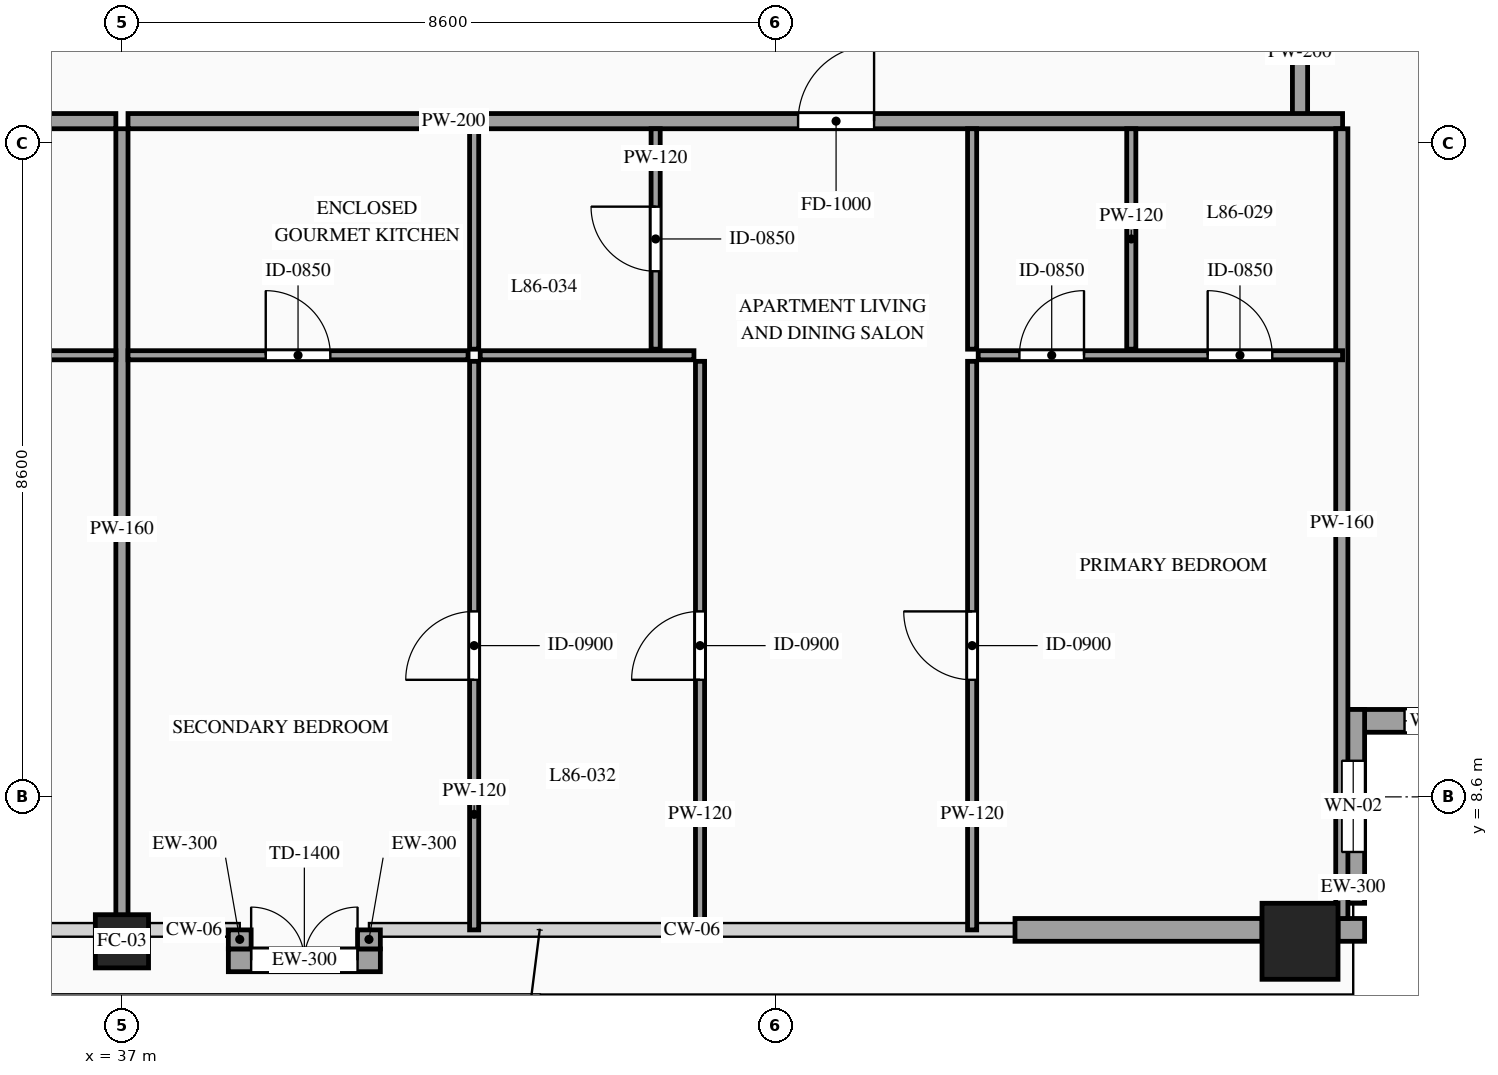
"""IFC4 building model, lengths in metres.
Left out: names, types, materials, properties, quantities, classifications, styles, units other than length and angle.
Written with IfcOpenShell. Run it as: python <this file> out.ifc"""

import sys

from ifc_helpers import new_model, si_unit, direction, frame, frame_2d, origin, origin_2d, place, context, subcontext, project, spatial, rectangle, hollow_rectangle, extrude, source, transform, mapped, element, fill, save


model = new_model("IFC4")
c1 = context("Model", 3, precision=1e-05, world=origin(), true_north=direction((0.0, 1.0)))
c2 = subcontext(c1, "Body", "Model", "MODEL_VIEW")
j1 = project(units=[si_unit("LENGTHUNIT", "METRE"), si_unit("PLANEANGLEUNIT", "RADIAN")], contexts=[c1])
p1 = place(None, origin())
s1 = spatial("IfcSite", under=j1, at=p1, CompositionType="ELEMENT")
p2 = place(p1, origin())
s2 = spatial("IfcBuilding", under=s1, at=p2, CompositionType="ELEMENT")
p3 = place(p2, frame((0.0, 0.0, 321.7)))
s3 = spatial("IfcBuildingStorey", under=s2, at=p3, CompositionType="ELEMENT", Elevation=321.7)
m1 = source(origin(), c2, "Body", "SweptSolid", [
    extrude(hollow_rectangle(XDim=0.7, YDim=0.7, WallThickness=0.032, at=origin_2d()), origin(), (0.0, 0.0, 1.0), 3.5),
])
p4 = place(p3, frame((37.0, 6.7, 0.0), z_axis=(0.0, 0.0, 1.0), x_axis=(1.0, 0.0, 0.0)))
e1 = element("IfcColumn", 1, at=p4, inside=s3, PredefinedType="COLUMN", context=c2, shape_type="MappedRepresentation", body=[
    mapped(m1, transform((0.0, 0.0, 0.0), scale=1.0)),
])
m2 = source(origin(), c2, "Body", "SweptSolid", [
    extrude(hollow_rectangle(XDim=1.0, YDim=1.0, WallThickness=0.048, at=origin_2d()), origin(), (0.0, 0.0, 1.0), 3.5),
])
p5 = place(p3, frame((52.5, 6.7, 0.0), z_axis=(0.0, 0.0, 1.0), x_axis=(1.0, 0.0, 0.0)))
e2 = element("IfcColumn", 2, at=p5, inside=s3, PredefinedType="COLUMN", context=c2, shape_type="MappedRepresentation", body=[
    mapped(m2, transform((0.0, 0.0, 0.0), scale=1.0)),
])
p6 = place(p3, frame((53.05, 9.6, 0.0), z_axis=(0.0, 0.0, 1.0), x_axis=(1.0, 0.0, 0.0)))
e3 = element("IfcWall", 3, at=p6, inside=s3, PredefinedType="SOLIDWALL", context=c2, shape_type="SweptSolid", body=[
    extrude(rectangle(XDim=2.55, YDim=0.3, at=frame_2d((1.275, 0.0))), origin(), (0.0, 0.0, 1.0), 3.28),
])
p7 = place(p6, frame((0.825, 0.0, 0.85)))
e4 = element("IfcOpeningElement", 4, at=p7, cuts=e3, PredefinedType="OPENING", context=c2, shape_type="SweptSolid", body=[
    extrude(rectangle(XDim=0.9, YDim=1.5, at=frame_2d((0.45, 0.75))), frame((0.0, 0.165, 0.0), z_axis=(0.0, -1.0, 0.0), x_axis=(1.0, 0.0, 0.0)), (0.0, 0.0, 1.0), 0.33),
])
p8 = place(p3, frame((53.2, 7.2, 0.0), z_axis=(0.0, 0.0, 1.0), x_axis=(0.0, 1.0, 0.0)))
e5 = element("IfcWall", 5, at=p8, inside=s3, PredefinedType="SOLIDWALL", context=c2, shape_type="SweptSolid", body=[
    extrude(rectangle(XDim=2.55, YDim=0.3, at=frame_2d((1.275, 0.0))), origin(), (0.0, 0.0, 1.0), 3.28),
])
p9 = place(p8, frame((0.675, 0.0, 0.85)))
e6 = element("IfcOpeningElement", 6, at=p9, cuts=e5, PredefinedType="OPENING", context=c2, shape_type="SweptSolid", body=[
    extrude(rectangle(XDim=1.2, YDim=2.1, at=frame_2d((0.6, 1.05))), frame((0.0, 0.165, 0.0), z_axis=(0.0, -1.0, 0.0), x_axis=(1.0, 0.0, 0.0)), (0.0, 0.0, 1.0), 0.33),
])
m3 = source(origin(), c2, "Body", "SweptSolid", [
    extrude(rectangle(XDim=0.35, YDim=0.3, at=frame_2d((0.175, 0.0))), origin(), (0.0, 0.0, 1.0), 3.28),
])
p10 = place(p3, frame((53.0, 6.85, 0.0), z_axis=(0.0, 0.0, 1.0), x_axis=(1.0, 0.0, 0.0)))
e7 = element("IfcWall", 7, at=p10, inside=s3, PredefinedType="SOLIDWALL", context=c2, shape_type="MappedRepresentation", body=[
    mapped(m3, transform((0.0, 0.0, 0.0), scale=1.0)),
])
m4 = source(origin(), c2, "Body", "SweptSolid", [
    extrude(rectangle(XDim=3.25, YDim=0.3, at=frame_2d((1.625, 0.0))), origin(), (0.0, 0.0, 1.0), 2.885),
])
p11 = place(p3, frame((48.75, 6.85, 0.0), z_axis=(0.0, 0.0, 1.0), x_axis=(1.0, 0.0, 0.0)))
e8 = element("IfcWall", 8, at=p11, inside=s3, PredefinedType="SOLIDWALL", context=c2, shape_type="MappedRepresentation", body=[
    mapped(m4, transform((0.0, 0.0, 0.0), scale=1.0)),
])
p12 = place(p3, frame((38.4, 6.45, 0.0), z_axis=(0.0, 0.0, 1.0), x_axis=(1.0, 0.0, 0.0)))
e9 = element("IfcWall", 9, at=p12, inside=s3, PredefinedType="SOLIDWALL", context=c2, shape_type="SweptSolid", body=[
    extrude(rectangle(XDim=2.0, YDim=0.3, at=frame_2d((1.0, 0.0))), origin(), (0.0, 0.0, 1.0), 2.885),
])
p13 = place(p12, frame((0.3, 0.0, 0.0)))
e10 = element("IfcOpeningElement", 10, at=p13, cuts=e9, PredefinedType="OPENING", context=c2, shape_type="SweptSolid", body=[
    extrude(rectangle(XDim=1.4, YDim=2.3, at=frame_2d((0.7, 1.15))), frame((0.0, 0.165, 0.0), z_axis=(0.0, -1.0, 0.0), x_axis=(1.0, 0.0, 0.0)), (0.0, 0.0, 1.0), 0.33),
])
m5 = source(origin(), c2, "Body", "SweptSolid", [
    extrude(rectangle(XDim=0.25, YDim=0.3, at=frame_2d((0.125, 0.0))), origin(), (0.0, 0.0, 1.0), 3.28),
])
for number, where, z_axis, x_axis in (
    (11, (38.55, 6.85, 0.0), (0.0, 0.0, 1.0), (0.0, -1.0, 0.0)),
    (12, (40.25, 6.6, 0.0), (0.0, 0.0, 1.0), (0.0, 1.0, 0.0)),
):
    element("IfcWall", number, at=place(p3, frame(where, z_axis=z_axis, x_axis=x_axis)), inside=s3, PredefinedType="SOLIDWALL", context=c2, shape_type="MappedRepresentation", body=[
        mapped(m5, transform((0.0, 0.0, 0.0), scale=1.0)),
    ])
m6 = source(origin(), c2, "Body", "SweptSolid", [
    extrude(rectangle(XDim=1.7, YDim=0.2, at=frame_2d((0.85, 0.0))), origin(), (0.0, 0.0, 1.0), 3.28),
])
p14 = place(p3, frame((52.5, 17.55, 0.0), z_axis=(0.0, 0.0, 1.0), x_axis=(0.0, 1.0, 0.0)))
e13 = element("IfcWall", 13, at=p14, inside=s3, PredefinedType="PARTITIONING", context=c2, shape_type="MappedRepresentation", body=[
    mapped(m6, transform((0.0, 0.0, 0.0), scale=1.0)),
])
p15 = place(p3, frame((20.94, 17.49, 0.0), z_axis=(0.0, 0.0, 1.0), x_axis=(1.0, 0.0, 0.0)))
e14 = element("IfcWall", 14, at=p15, inside=s3, PredefinedType="PARTITIONING", context=c2, shape_type="SweptSolid", body=[
    extrude(rectangle(XDim=15.98, YDim=0.2, at=frame_2d((7.99, 0.0))), origin(), (0.0, 0.0, 1.0), 3.28),
])
p16 = place(p15, frame((8.816, 0.0, 0.0)))
e15 = element("IfcOpeningElement", 15, at=p16, cuts=e14, PredefinedType="OPENING", context=c2, shape_type="SweptSolid", body=[
    extrude(rectangle(XDim=1.0, YDim=2.2, at=frame_2d((0.5, 1.1))), frame((0.0, 0.115, 0.0), z_axis=(0.0, -1.0, 0.0), x_axis=(1.0, 0.0, 0.0)), (0.0, 0.0, 1.0), 0.23),
])
m7 = source(origin(), c2, "Body", "SweptSolid", [
    extrude(rectangle(XDim=10.54, YDim=0.16, at=frame_2d((5.27, 0.0))), origin(), (0.0, 0.0, 1.0), 2.787),
])
p17 = place(p3, frame((37.0, 6.85, 0.0), z_axis=(0.0, 0.0, 1.0), x_axis=(0.0, 1.0, 0.0)))
e16 = element("IfcWall", 16, at=p17, inside=s3, PredefinedType="PARTITIONING", context=c2, shape_type="MappedRepresentation", body=[
    mapped(m7, transform((0.0, 0.0, 0.0), scale=1.0)),
])
p18 = place(p3, frame((32.126, 14.41, 0.0), z_axis=(0.0, 0.0, 1.0), x_axis=(1.0, 0.0, 0.0)))
e17 = element("IfcWall", 17, at=p18, inside=s3, PredefinedType="PARTITIONING", context=c2, shape_type="SweptSolid", body=[
    extrude(rectangle(XDim=4.794, YDim=0.12, at=frame_2d((2.397, 0.0))), origin(), (0.0, 0.0, 1.0), 3.28),
])
p19 = place(p18, frame((3.019, 0.0, 0.0)))
e18 = element("IfcOpeningElement", 18, at=p19, cuts=e17, PredefinedType="OPENING", context=c2, shape_type="SweptSolid", body=[
    extrude(rectangle(XDim=0.85, YDim=2.1, at=frame_2d((0.425, 1.05))), frame((0.0, 0.075, 0.0), z_axis=(0.0, -1.0, 0.0), x_axis=(1.0, 0.0, 0.0)), (0.0, 0.0, 1.0), 0.15),
])
p20 = place(p18, frame((0.542, 0.0, 0.0)))
e19 = element("IfcOpeningElement", 19, at=p20, cuts=e17, PredefinedType="OPENING", context=c2, shape_type="SweptSolid", body=[
    extrude(rectangle(XDim=0.85, YDim=2.1, at=frame_2d((0.425, 1.05))), frame((0.0, 0.075, 0.0), z_axis=(0.0, -1.0, 0.0), x_axis=(1.0, 0.0, 0.0)), (0.0, 0.0, 1.0), 0.15),
])
p21 = place(p3, frame((37.08, 17.49, 0.0), z_axis=(0.0, 0.0, 1.0), x_axis=(1.0, 0.0, 0.0)))
e20 = element("IfcWall", 20, at=p21, inside=s3, PredefinedType="PARTITIONING", context=c2, shape_type="SweptSolid", body=[
    extrude(rectangle(XDim=15.98, YDim=0.2, at=frame_2d((7.99, 0.0))), origin(), (0.0, 0.0, 1.0), 3.28),
])
p22 = place(p21, frame((8.816, 0.0, 0.0)))
e21 = element("IfcOpeningElement", 21, at=p22, cuts=e20, PredefinedType="OPENING", context=c2, shape_type="SweptSolid", body=[
    extrude(rectangle(XDim=1.0, YDim=2.2, at=frame_2d((0.5, 1.1))), frame((0.0, 0.115, 0.0), z_axis=(0.0, -1.0, 0.0), x_axis=(1.0, 0.0, 0.0)), (0.0, 0.0, 1.0), 0.23),
])
m8 = source(origin(), c2, "Body", "SweptSolid", [
    extrude(rectangle(XDim=10.39, YDim=0.16, at=frame_2d((5.195, 0.0))), origin(), (0.0, 0.0, 1.0), 3.28),
])
p23 = place(p3, frame((53.05, 7.0, 0.0), z_axis=(0.0, 0.0, 1.0), x_axis=(0.0, 1.0, 0.0)))
e22 = element("IfcWall", 22, at=p23, inside=s3, PredefinedType="PARTITIONING", context=c2, shape_type="MappedRepresentation", body=[
    mapped(m8, transform((0.0, 0.0, 0.0), scale=1.0)),
])
p24 = place(p3, frame((37.08, 14.41, 0.0), z_axis=(0.0, 0.0, 1.0), x_axis=(1.0, 0.0, 0.0)))
e23 = element("IfcWall", 23, at=p24, inside=s3, PredefinedType="PARTITIONING", context=c2, shape_type="SweptSolid", body=[
    extrude(rectangle(XDim=4.474, YDim=0.12, at=frame_2d((2.237, 0.0))), origin(), (0.0, 0.0, 1.0), 3.28),
])
p25 = place(p24, frame((1.812, 0.0, 0.0)))
e24 = element("IfcOpeningElement", 24, at=p25, cuts=e23, PredefinedType="OPENING", context=c2, shape_type="SweptSolid", body=[
    extrude(rectangle(XDim=0.85, YDim=2.1, at=frame_2d((0.425, 1.05))), frame((0.0, 0.075, 0.0), z_axis=(0.0, -1.0, 0.0), x_axis=(1.0, 0.0, 0.0)), (0.0, 0.0, 1.0), 0.15),
])
m9 = source(origin(), c2, "Body", "SweptSolid", [
    extrude(rectangle(XDim=2.9, YDim=0.12, at=frame_2d((1.45, 0.0))), origin(), (0.0, 0.0, 1.0), 3.28),
])
p26 = place(p3, frame((41.634, 14.49, 0.0), z_axis=(0.0, 0.0, 1.0), x_axis=(0.0, 1.0, 0.0)))
e25 = element("IfcWall", 25, at=p26, inside=s3, PredefinedType="PARTITIONING", context=c2, shape_type="MappedRepresentation", body=[
    mapped(m9, transform((0.0, 0.0, 0.0), scale=1.0)),
])
p27 = place(p3, frame((44.022, 14.49, 0.0), z_axis=(0.0, 0.0, 1.0), x_axis=(0.0, 1.0, 0.0)))
e26 = element("IfcWall", 26, at=p27, inside=s3, PredefinedType="PARTITIONING", context=c2, shape_type="SweptSolid", body=[
    extrude(rectangle(XDim=2.9, YDim=0.12, at=frame_2d((1.45, 0.0))), origin(), (0.0, 0.0, 1.0), 3.28),
])
p28 = place(p27, frame((1.025, 0.0, 0.0)))
e27 = element("IfcOpeningElement", 27, at=p28, cuts=e26, PredefinedType="OPENING", context=c2, shape_type="SweptSolid", body=[
    extrude(rectangle(XDim=0.85, YDim=2.1, at=frame_2d((0.425, 1.05))), frame((0.0, 0.075, 0.0), z_axis=(0.0, -1.0, 0.0), x_axis=(1.0, 0.0, 0.0)), (0.0, 0.0, 1.0), 0.15),
])
m10 = source(origin(), c2, "Body", "SweptSolid", [
    extrude(rectangle(XDim=2.9, YDim=0.12, at=frame_2d((1.45, 0.0))), origin(), (0.0, 0.0, 1.0), 2.825),
])
p29 = place(p3, frame((50.28, 14.49, 0.0), z_axis=(0.0, 0.0, 1.0), x_axis=(0.0, 1.0, 0.0)))
e28 = element("IfcWall", 28, at=p29, inside=s3, PredefinedType="PARTITIONING", context=c2, shape_type="MappedRepresentation", body=[
    mapped(m10, transform((0.0, 0.0, 0.0), scale=1.0)),
])
p30 = place(p3, frame((48.186, 14.49, 0.0), z_axis=(0.0, 0.0, 1.0), x_axis=(0.0, 1.0, 0.0)))
e29 = element("IfcWall", 29, at=p30, inside=s3, PredefinedType="PARTITIONING", context=c2, shape_type="MappedRepresentation", body=[
    mapped(m9, transform((0.0, 0.0, 0.0), scale=1.0)),
])
p31 = place(p3, frame((41.634, 6.85, 0.0), z_axis=(0.0, 0.0, 1.0), x_axis=(0.0, 1.0, 0.0)))
e30 = element("IfcWall", 30, at=p31, inside=s3, PredefinedType="PARTITIONING", context=c2, shape_type="SweptSolid", body=[
    extrude(rectangle(XDim=7.48, YDim=0.12, at=frame_2d((3.74, 0.0))), origin(), (0.0, 0.0, 1.0), 3.28),
])
p32 = place(p31, frame((3.29, 0.0, 0.0)))
e31 = element("IfcOpeningElement", 31, at=p32, cuts=e30, PredefinedType="OPENING", context=c2, shape_type="SweptSolid", body=[
    extrude(rectangle(XDim=0.9, YDim=2.15, at=frame_2d((0.45, 1.075))), frame((0.0, 0.075, 0.0), z_axis=(0.0, -1.0, 0.0), x_axis=(1.0, 0.0, 0.0)), (0.0, 0.0, 1.0), 0.15),
])
p33 = place(p3, frame((48.266, 14.41, 0.0), z_axis=(0.0, 0.0, 1.0), x_axis=(1.0, 0.0, 0.0)))
e32 = element("IfcWall", 32, at=p33, inside=s3, PredefinedType="PARTITIONING", context=c2, shape_type="SweptSolid", body=[
    extrude(rectangle(XDim=4.794, YDim=0.12, at=frame_2d((2.397, 0.0))), origin(), (0.0, 0.0, 1.0), 3.28),
])
p34 = place(p33, frame((3.019, 0.0, 0.0)))
e33 = element("IfcOpeningElement", 33, at=p34, cuts=e32, PredefinedType="OPENING", context=c2, shape_type="SweptSolid", body=[
    extrude(rectangle(XDim=0.85, YDim=2.1, at=frame_2d((0.425, 1.05))), frame((0.0, 0.075, 0.0), z_axis=(0.0, -1.0, 0.0), x_axis=(1.0, 0.0, 0.0)), (0.0, 0.0, 1.0), 0.15),
])
p35 = place(p33, frame((0.542, 0.0, 0.0)))
e34 = element("IfcOpeningElement", 34, at=p35, cuts=e32, PredefinedType="OPENING", context=c2, shape_type="SweptSolid", body=[
    extrude(rectangle(XDim=0.85, YDim=2.1, at=frame_2d((0.425, 1.05))), frame((0.0, 0.075, 0.0), z_axis=(0.0, -1.0, 0.0), x_axis=(1.0, 0.0, 0.0)), (0.0, 0.0, 1.0), 0.15),
])
p36 = place(p3, frame((48.186, 6.85, 0.0), z_axis=(0.0, 0.0, 1.0), x_axis=(0.0, 1.0, 0.0)))
e35 = element("IfcWall", 35, at=p36, inside=s3, PredefinedType="PARTITIONING", context=c2, shape_type="SweptSolid", body=[
    extrude(rectangle(XDim=7.48, YDim=0.12, at=frame_2d((3.74, 0.0))), origin(), (0.0, 0.0, 1.0), 3.28),
])
p37 = place(p36, frame((3.29, 0.0, 0.0)))
e36 = element("IfcOpeningElement", 36, at=p37, cuts=e35, PredefinedType="OPENING", context=c2, shape_type="SweptSolid", body=[
    extrude(rectangle(XDim=0.9, YDim=2.15, at=frame_2d((0.45, 1.075))), frame((0.0, 0.075, 0.0), z_axis=(0.0, -1.0, 0.0), x_axis=(1.0, 0.0, 0.0)), (0.0, 0.0, 1.0), 0.15),
])
m11 = source(origin(), c2, "Body", "SweptSolid", [
    extrude(rectangle(XDim=2.812, YDim=0.12, at=frame_2d((1.406, 0.0))), origin(), (0.0, 0.0, 1.0), 3.28),
])
p38 = place(p3, frame((41.714, 14.41, 0.0), z_axis=(0.0, 0.0, 1.0), x_axis=(1.0, 0.0, 0.0)))
e37 = element("IfcWall", 37, at=p38, inside=s3, PredefinedType="PARTITIONING", context=c2, shape_type="MappedRepresentation", body=[
    mapped(m11, transform((0.0, 0.0, 0.0), scale=1.0)),
])
p39 = place(p3, frame((44.606, 6.85, 0.0), z_axis=(0.0, 0.0, 1.0), x_axis=(0.0, 1.0, 0.0)))
e38 = element("IfcWall", 38, at=p39, inside=s3, PredefinedType="PARTITIONING", context=c2, shape_type="SweptSolid", body=[
    extrude(rectangle(XDim=7.48, YDim=0.12, at=frame_2d((3.74, 0.0))), origin(), (0.0, 0.0, 1.0), 3.28),
])
p40 = place(p39, frame((3.29, 0.0, 0.0)))
e39 = element("IfcOpeningElement", 39, at=p40, cuts=e38, PredefinedType="OPENING", context=c2, shape_type="SweptSolid", body=[
    extrude(rectangle(XDim=0.9, YDim=2.15, at=frame_2d((0.45, 1.075))), frame((0.0, 0.075, 0.0), z_axis=(0.0, -1.0, 0.0), x_axis=(1.0, 0.0, 0.0)), (0.0, 0.0, 1.0), 0.15),
])
m12 = source(origin(), c2, "Body", "SweptSolid", [
    extrude(rectangle(XDim=0.9, YDim=1.5, at=frame_2d((0.45, 0.75))), frame((0.0, 0.03, 0.0), z_axis=(0.0, -1.0, 0.0), x_axis=(1.0, 0.0, 0.0)), (0.0, 0.0, 1.0), 0.06),
])
p41 = place(p7, origin())
e40 = element("IfcWindow", 40, at=p41, inside=s3, PartitioningType="SINGLE_PANEL", PredefinedType="WINDOW", context=c2, shape_type="MappedRepresentation", body=[
    mapped(m12, transform((0.0, 0.0, 0.0), scale=1.0)),
])
fill(e4, e40)
m13 = source(origin(), c2, "Body", "SweptSolid", [
    extrude(rectangle(XDim=1.2, YDim=2.1, at=frame_2d((0.6, 1.05))), frame((0.0, 0.03, 0.0), z_axis=(0.0, -1.0, 0.0), x_axis=(1.0, 0.0, 0.0)), (0.0, 0.0, 1.0), 0.06),
])
p42 = place(p9, origin())
e41 = element("IfcWindow", 41, at=p42, inside=s3, PartitioningType="SINGLE_PANEL", PredefinedType="WINDOW", context=c2, shape_type="MappedRepresentation", body=[
    mapped(m13, transform((0.0, 0.0, 0.0), scale=1.0)),
])
fill(e6, e41)
m14 = source(origin(), c2, "Body", "SweptSolid", [
    extrude(rectangle(XDim=1.4, YDim=2.3, at=frame_2d((0.7, 1.15))), frame((0.0, 0.025, 0.0), z_axis=(0.0, -1.0, 0.0), x_axis=(1.0, 0.0, 0.0)), (0.0, 0.0, 1.0), 0.05),
])
p43 = place(p13, origin())
e42 = element("IfcDoor", 42, at=p43, inside=s3, OperationType="DOUBLE_DOOR_SINGLE_SWING", PredefinedType="DOOR", context=c2, shape_type="MappedRepresentation", body=[
    mapped(m14, transform((0.0, 0.0, 0.0), scale=1.0)),
])
fill(e10, e42)
m15 = source(origin(), c2, "Body", "SweptSolid", [
    extrude(rectangle(XDim=1.0, YDim=2.2, at=frame_2d((0.5, 1.1))), frame((0.0, 0.025, 0.0), z_axis=(0.0, -1.0, 0.0), x_axis=(1.0, 0.0, 0.0)), (0.0, 0.0, 1.0), 0.05),
])
p44 = place(p22, origin())
e43 = element("IfcDoor", 43, at=p44, inside=s3, OperationType="SINGLE_SWING_RIGHT", PredefinedType="DOOR", context=c2, shape_type="MappedRepresentation", body=[
    mapped(m15, transform((0.0, 0.0, 0.0), scale=1.0)),
])
fill(e21, e43)
m16 = source(origin(), c2, "Body", "SweptSolid", [
    extrude(rectangle(XDim=0.85, YDim=2.1, at=frame_2d((0.425, 1.05))), frame((0.0, 0.025, 0.0), z_axis=(0.0, -1.0, 0.0), x_axis=(1.0, 0.0, 0.0)), (0.0, 0.0, 1.0), 0.05),
])
p45 = place(p25, origin())
e44 = element("IfcDoor", 44, at=p45, inside=s3, OperationType="SINGLE_SWING_LEFT", PredefinedType="DOOR", context=c2, shape_type="MappedRepresentation", body=[
    mapped(m16, transform((0.0, 0.0, 0.0), scale=1.0)),
])
fill(e24, e44)
p46 = place(p28, origin())
e45 = element("IfcDoor", 45, at=p46, inside=s3, OperationType="SINGLE_SWING_RIGHT", PredefinedType="DOOR", context=c2, shape_type="MappedRepresentation", body=[
    mapped(m16, transform((0.0, 0.0, 0.0), scale=1.0)),
])
fill(e27, e45)
p47 = place(p34, origin())
e46 = element("IfcDoor", 46, at=p47, inside=s3, OperationType="SINGLE_SWING_LEFT", PredefinedType="DOOR", context=c2, shape_type="MappedRepresentation", body=[
    mapped(m16, transform((0.0, 0.0, 0.0), scale=1.0)),
])
fill(e33, e46)
p48 = place(p35, origin())
e47 = element("IfcDoor", 47, at=p48, inside=s3, OperationType="SINGLE_SWING_RIGHT", PredefinedType="DOOR", context=c2, shape_type="MappedRepresentation", body=[
    mapped(m16, transform((0.0, 0.0, 0.0), scale=1.0)),
])
fill(e34, e47)
m17 = source(origin(), c2, "Body", "SweptSolid", [
    extrude(rectangle(XDim=0.9, YDim=2.15, at=frame_2d((0.45, 1.075))), frame((0.0, 0.025, 0.0), z_axis=(0.0, -1.0, 0.0), x_axis=(1.0, 0.0, 0.0)), (0.0, 0.0, 1.0), 0.05),
])
p49 = place(p32, origin())
e48 = element("IfcDoor", 48, at=p49, inside=s3, OperationType="SINGLE_SWING_LEFT", PredefinedType="DOOR", context=c2, shape_type="MappedRepresentation", body=[
    mapped(m17, transform((0.0, 0.0, 0.0), scale=1.0)),
])
fill(e31, e48)
p50 = place(p37, origin())
e49 = element("IfcDoor", 49, at=p50, inside=s3, OperationType="SINGLE_SWING_RIGHT", PredefinedType="DOOR", context=c2, shape_type="MappedRepresentation", body=[
    mapped(m17, transform((0.0, 0.0, 0.0), scale=1.0)),
])
fill(e36, e49)
p51 = place(p40, origin())
e50 = element("IfcDoor", 50, at=p51, inside=s3, OperationType="SINGLE_SWING_LEFT", PredefinedType="DOOR", context=c2, shape_type="MappedRepresentation", body=[
    mapped(m17, transform((0.0, 0.0, 0.0), scale=1.0)),
])
fill(e39, e50)
save(model, sys.argv[1])
